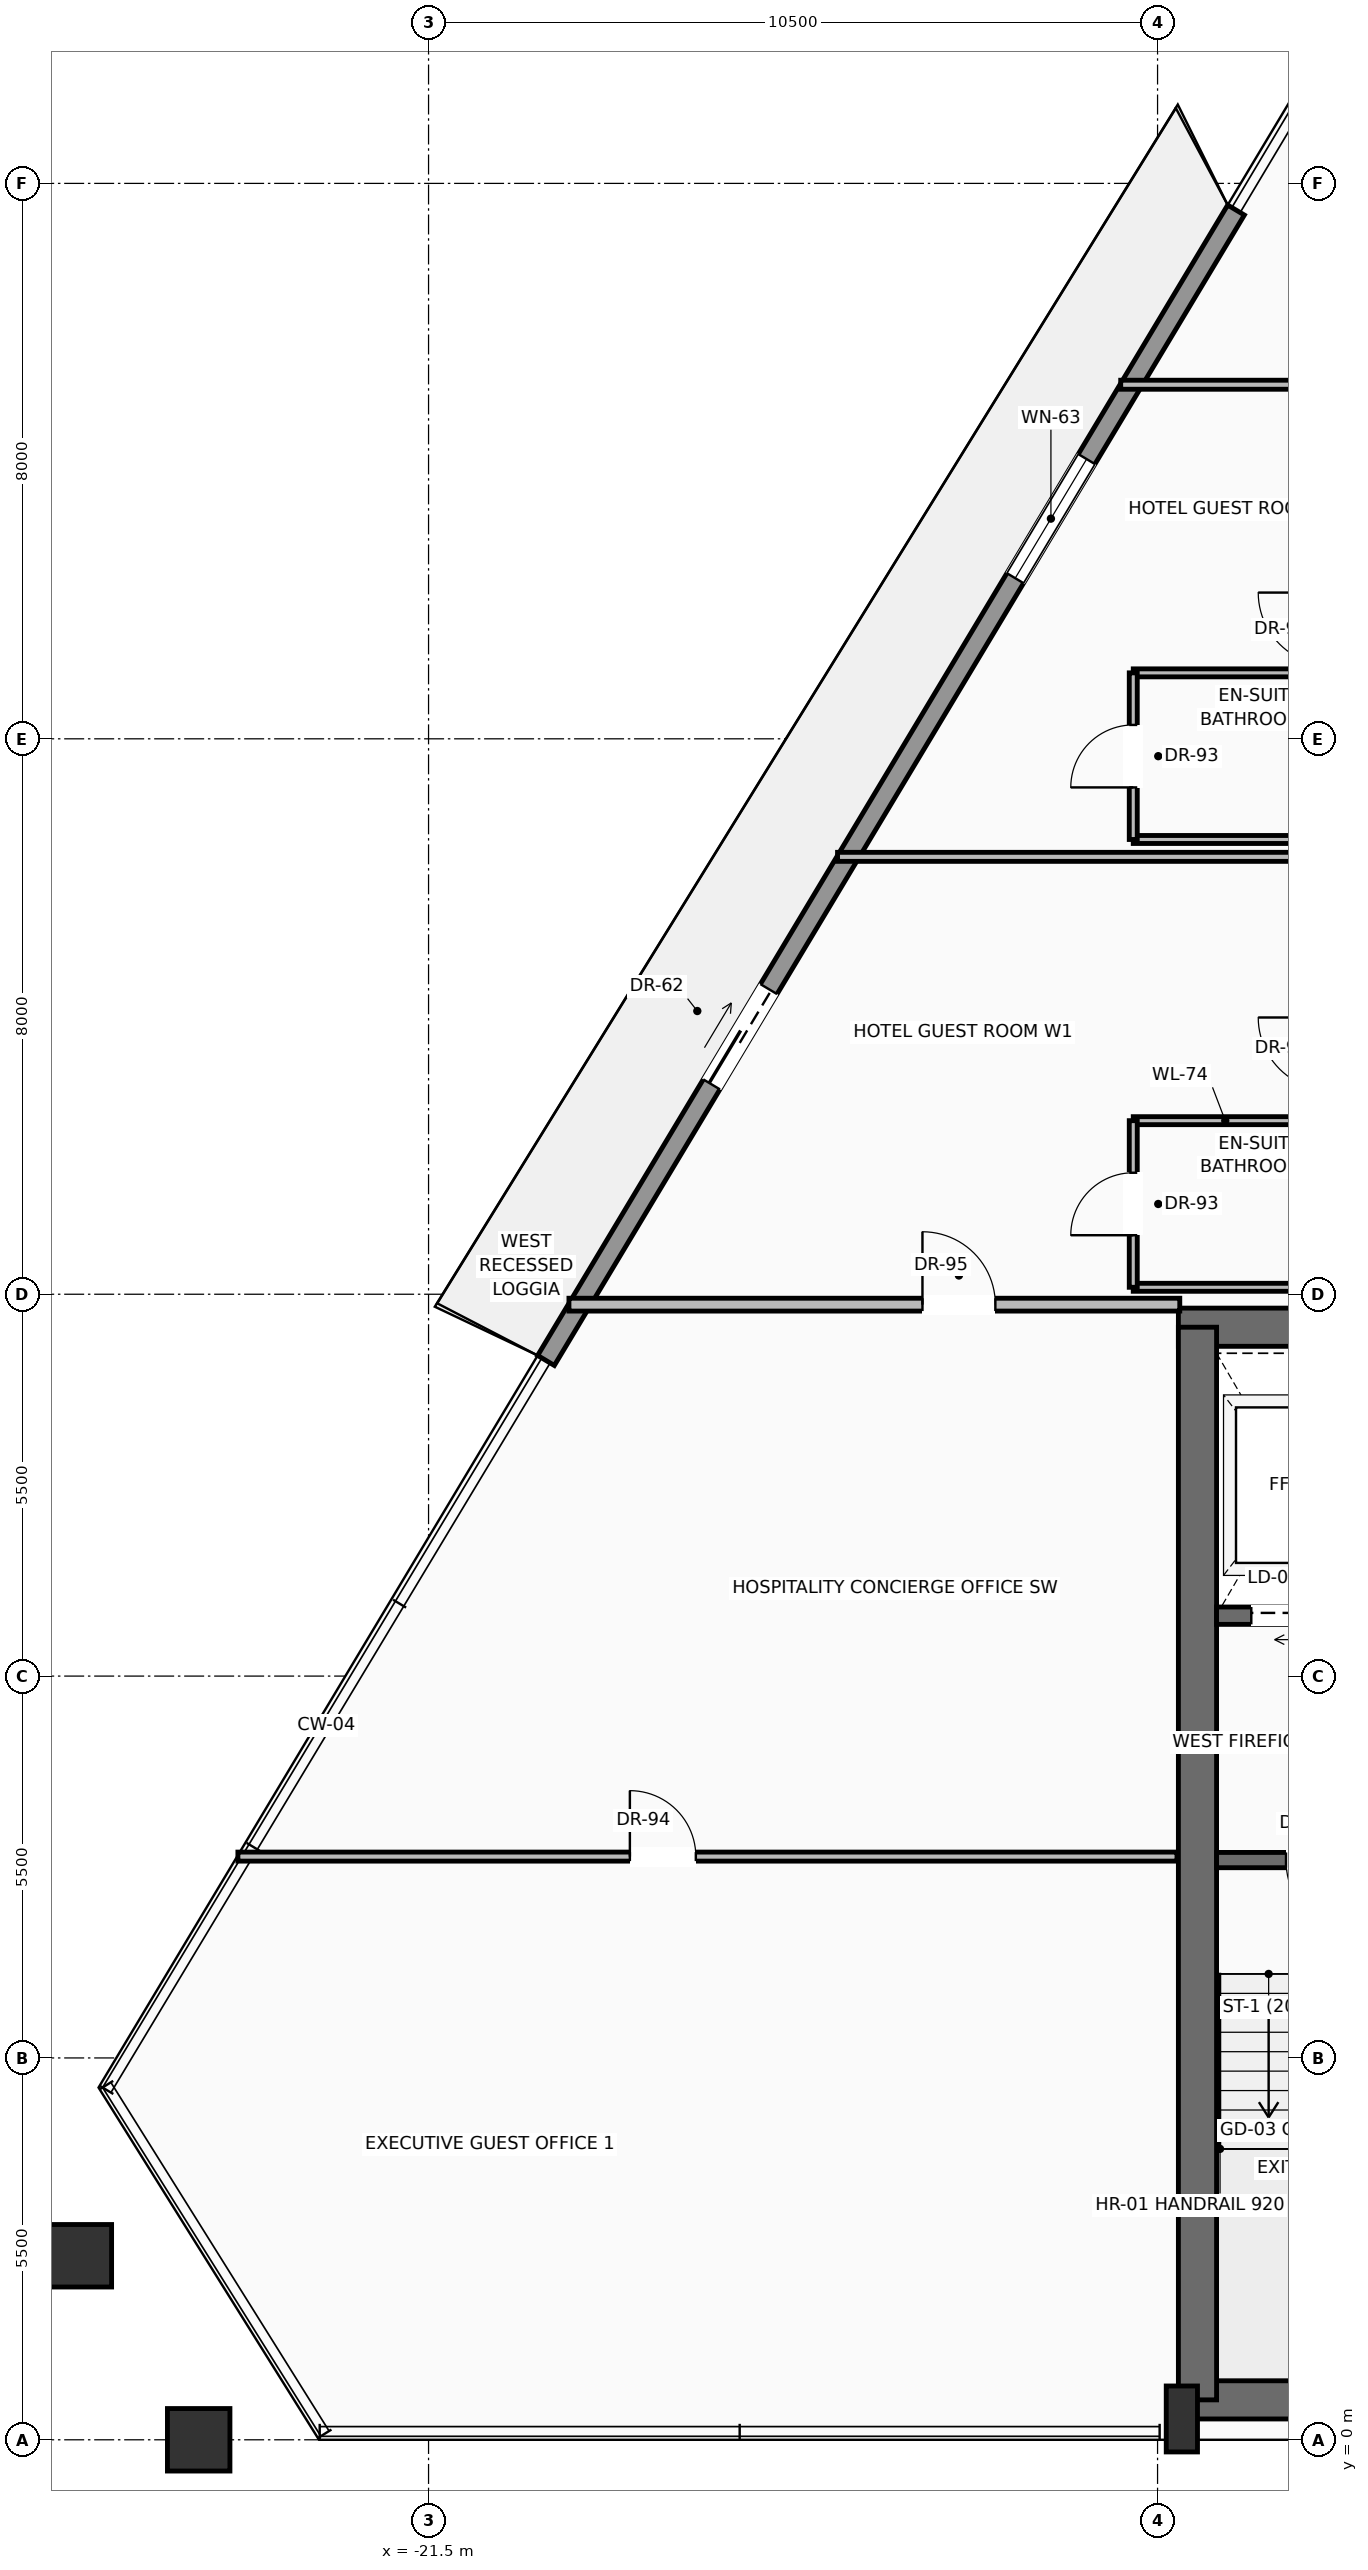
"""IFC4 building model, lengths in metres.
Left out: names, types, materials, properties, quantities, classifications, styles, units other than length and angle.
Written with IfcOpenShell. Run it as: python <this file> out.ifc"""

import sys

from ifc_helpers import new_model, si_unit, direction, frame, frame_2d, origin, origin_2d, place, context, subcontext, project, spatial, rectangle, hollow_rectangle, extrude, source, transform, mapped, element, fill, save


model = new_model("IFC4")
c1 = context("Model", 3, precision=1e-05, world=origin(), true_north=direction((0.0, 1.0)))
c2 = subcontext(c1, "Body", "Model", "MODEL_VIEW")
j1 = project(units=[si_unit("LENGTHUNIT", "METRE"), si_unit("PLANEANGLEUNIT", "RADIAN")], contexts=[c1])
p1 = place(None, origin())
s1 = spatial("IfcSite", under=j1, at=p1, CompositionType="ELEMENT")
p2 = place(p1, origin())
s2 = spatial("IfcBuilding", under=s1, at=p2, CompositionType="ELEMENT")
p3 = place(p2, frame((0.0, 0.0, 220.0)))
s3 = spatial("IfcBuildingStorey", under=s2, at=p3, CompositionType="ELEMENT", Elevation=220.0)
p4 = place(p3, frame((-10.65, 0.575, 0.0), z_axis=(0.0, 0.0, 1.0), x_axis=(1.0, 0.0, 0.0)))
e1 = element("IfcWall", 1, at=p4, inside=s3, PredefinedType="SHEAR", context=c2, shape_type="SweptSolid", body=[
    extrude(rectangle(XDim=21.3, YDim=0.55, at=frame_2d((10.65, 0.0))), origin(), (0.0, 0.0, 1.0), 3.24),
])
p5 = place(p3, frame((-10.7, 16.025, 0.0), z_axis=(0.0, 0.0, 1.0), x_axis=(1.0, 0.0, 0.0)))
e2 = element("IfcWall", 2, at=p5, inside=s3, PredefinedType="SHEAR", context=c2, shape_type="SweptSolid", body=[
    extrude(rectangle(XDim=21.4, YDim=0.55, at=frame_2d((10.7, 0.0))), origin(), (0.0, 0.0, 1.0), 3.24),
])
p6 = place(p5, frame((3.27, 0.0, 0.0)))
e3 = element("IfcOpeningElement", 3, at=p6, cuts=e2, PredefinedType="OPENING", context=c2, shape_type="SweptSolid", body=[
    extrude(rectangle(XDim=1.3, YDim=2.3, at=frame_2d((0.65, 1.15))), frame((0.0, 0.285, 0.0), z_axis=(0.0, -1.0, 0.0), x_axis=(1.0, 0.0, 0.0)), (0.0, 0.0, 1.0), 0.57),
])
p7 = place(p5, frame((9.7, 0.0, 0.0)))
e4 = element("IfcOpeningElement", 4, at=p7, cuts=e2, PredefinedType="OPENING", context=c2, shape_type="SweptSolid", body=[
    extrude(rectangle(XDim=2.0, YDim=2.4, at=frame_2d((1.0, 1.2))), frame((0.0, 0.285, 0.0), z_axis=(0.0, -1.0, 0.0), x_axis=(1.0, 0.0, 0.0)), (0.0, 0.0, 1.0), 0.57),
])
p8 = place(p3, frame((-10.425, 0.575, 0.0), z_axis=(0.0, 0.0, 1.0), x_axis=(0.0, 1.0, 0.0)))
e5 = element("IfcWall", 5, at=p8, inside=s3, PredefinedType="SHEAR", context=c2, shape_type="SweptSolid", body=[
    extrude(rectangle(XDim=15.45, YDim=0.55, at=frame_2d((7.725, 0.0))), origin(), (0.0, 0.0, 1.0), 3.24),
])
m1 = source(origin(), c2, "Body", "SweptSolid", [
    extrude(rectangle(XDim=0.45, YDim=0.95, at=origin_2d()), origin(), (0.0, 0.0, 1.0), 3.45),
])
p9 = place(p3, frame((-10.65, 0.3, 0.0), z_axis=(0.0, 0.0, 1.0), x_axis=(1.0, 0.0, 0.0)))
e6 = element("IfcColumn", 6, at=p9, inside=s3, PredefinedType="PILASTER", context=c2, shape_type="MappedRepresentation", body=[
    mapped(m1, transform((0.0, 0.0, 0.0), scale=1.0)),
])
m2 = source(origin(), c2, "Body", "SweptSolid", [
    extrude(hollow_rectangle(XDim=0.9, YDim=0.9, WallThickness=0.045, at=origin_2d()), origin(), (0.0, 0.0, 1.0), 3.441),
])
p10 = place(p3, frame((-24.811, 0.0, 0.004), z_axis=(-0.005108127751, 0.0, 0.99998695343), x_axis=(0.0, -1.0, 0.0)))
e7 = element("IfcColumn", 7, at=p10, inside=s3, PredefinedType="COLUMN", context=c2, shape_type="MappedRepresentation", body=[
    mapped(m2, transform((0.0, 0.0, 0.0), scale=1.0)),
])
m3 = source(origin(), c2, "Body", "SweptSolid", [
    extrude(hollow_rectangle(XDim=0.9, YDim=0.9, WallThickness=0.045, at=origin_2d()), origin(), (0.0, 0.0, 1.0), 3.442),
])
p11 = place(p3, frame((-26.515, 2.651, 0.004), z_axis=(0.007164359834, -0.017662629689, 0.999818335229), x_axis=(0.926669210153, 0.375877872392, 0.0)))
e8 = element("IfcColumn", 8, at=p11, inside=s3, PredefinedType="COLUMN", context=c2, shape_type="MappedRepresentation", body=[
    mapped(m3, transform((0.0, 0.0, 0.0), scale=1.0)),
])
p12 = place(p3, frame((-19.808, 15.546, 0.0), z_axis=(0.0, 0.0, 1.0), x_axis=(0.514354531287, 0.857577644382, 0.0)))
e9 = element("IfcWall", 9, at=p12, inside=s3, PredefinedType="SOLIDWALL", context=c2, shape_type="SweptSolid", body=[
    extrude(rectangle(XDim=19.322, YDim=0.28, at=frame_2d((9.661, 0.0))), origin(), (0.0, 0.0, 1.0), 2.82),
])
p13 = place(p12, frame((4.637, 0.0, 0.0)))
e10 = element("IfcOpeningElement", 10, at=p13, cuts=e9, PredefinedType="OPENING", context=c2, shape_type="SweptSolid", body=[
    extrude(rectangle(XDim=1.6, YDim=2.35, at=frame_2d((0.8, 1.175))), frame((0.0, 0.15, 0.0), z_axis=(0.0, -1.0, 0.0), x_axis=(1.0, 0.0, 0.0)), (0.0, 0.0, 1.0), 0.3),
])
p14 = place(p12, frame((13.139, 0.0, 0.9)))
e11 = element("IfcOpeningElement", 11, at=p14, cuts=e9, PredefinedType="OPENING", context=c2, shape_type="SweptSolid", body=[
    extrude(rectangle(XDim=2.0, YDim=1.75, at=frame_2d((1.0, 0.875))), frame((0.0, 0.15, 0.0), z_axis=(0.0, -1.0, 0.0), x_axis=(1.0, 0.0, 0.0)), (0.0, 0.0, 1.0), 0.3),
])
p15 = place(p3, frame((-5.5, 8.35, 0.0), z_axis=(0.0, 0.0, 1.0), x_axis=(-1.0, 0.0, 0.0)))
e12 = element("IfcWall", 12, at=p15, inside=s3, PredefinedType="SOLIDWALL", context=c2, shape_type="SweptSolid", body=[
    extrude(rectangle(XDim=4.65, YDim=0.22, at=frame_2d((2.325, 0.0))), origin(), (0.0, 0.0, 1.0), 3.24),
])
p16 = place(p15, frame((2.5, 0.0, 0.0)))
e13 = element("IfcOpeningElement", 13, at=p16, cuts=e12, PredefinedType="OPENING", context=c2, shape_type="SweptSolid", body=[
    extrude(rectangle(XDim=1.15, YDim=2.2, at=frame_2d((0.575, 1.1))), frame((0.0, 0.12, 0.0), z_axis=(0.0, -1.0, 0.0), x_axis=(1.0, 0.0, 0.0)), (0.0, 0.0, 1.0), 0.24),
])
p17 = place(p3, frame((-5.5, 11.87, 0.0), z_axis=(0.0, 0.0, 1.0), x_axis=(-1.0, 0.0, 0.0)))
e14 = element("IfcWall", 14, at=p17, inside=s3, PredefinedType="SOLIDWALL", context=c2, shape_type="SweptSolid", body=[
    extrude(rectangle(XDim=4.65, YDim=0.25, at=frame_2d((2.325, 0.0))), origin(), (0.0, 0.0, 1.0), 3.24),
])
p18 = place(p17, frame((2.95, 0.0, 0.0)))
e15 = element("IfcOpeningElement", 15, at=p18, cuts=e14, PredefinedType="OPENING", context=c2, shape_type="SweptSolid", body=[
    extrude(rectangle(XDim=1.2, YDim=2.25, at=frame_2d((0.6, 1.125))), frame((0.0, 0.135, 0.0), z_axis=(0.0, -1.0, 0.0), x_axis=(1.0, 0.0, 0.0)), (0.0, 0.0, 1.0), 0.27),
])
p19 = place(p3, frame((-19.478, 16.35, 0.0), z_axis=(0.0, 0.0, 1.0), x_axis=(1.0, 0.0, 0.0)))
e16 = element("IfcWall", 16, at=p19, inside=s3, PredefinedType="PARTITIONING", context=c2, shape_type="SweptSolid", body=[
    extrude(rectangle(XDim=8.798, YDim=0.185, at=frame_2d((4.399, 0.0))), origin(), (0.0, 0.0, 1.0), 3.232),
])
p20 = place(p19, frame((5.092, 0.0, 0.0)))
e17 = element("IfcOpeningElement", 17, at=p20, cuts=e16, PredefinedType="OPENING", context=c2, shape_type="SweptSolid", body=[
    extrude(rectangle(XDim=1.05, YDim=2.25, at=frame_2d((0.525, 1.125))), frame((0.0, 0.103, 0.0), z_axis=(0.0, -1.0, 0.0), x_axis=(1.0, 0.0, 0.0)), (0.0, 0.0, 1.0), 0.205),
])
p21 = place(p3, frame((-11.531, 29.6, 0.0), z_axis=(0.0, 0.0, 1.0), x_axis=(1.0, 0.0, 0.0)))
e18 = element("IfcWall", 18, at=p21, inside=s3, PredefinedType="PARTITIONING", context=c2, shape_type="SweptSolid", body=[
    extrude(rectangle(XDim=3.031, YDim=0.13, at=frame_2d((1.515, 0.0))), origin(), (0.0, 0.0, 1.0), 3.232),
])
p22 = place(p3, frame((-24.246, 8.4, 0.0), z_axis=(0.0, 0.0, 1.0), x_axis=(1.0, 0.0, 0.0)))
e19 = element("IfcWall", 19, at=p22, inside=s3, PredefinedType="PARTITIONING", context=c2, shape_type="SweptSolid", body=[
    extrude(rectangle(XDim=13.526, YDim=0.13, at=frame_2d((6.763, 0.0))), origin(), (0.0, 0.0, 1.0), 3.232),
])
p23 = place(p22, frame((5.646, 0.0, 0.0)))
e20 = element("IfcOpeningElement", 20, at=p23, cuts=e19, PredefinedType="OPENING", context=c2, shape_type="SweptSolid", body=[
    extrude(rectangle(XDim=0.95, YDim=2.2, at=frame_2d((0.475, 1.1))), frame((0.0, 0.075, 0.0), z_axis=(0.0, -1.0, 0.0), x_axis=(1.0, 0.0, 0.0)), (0.0, 0.0, 1.0), 0.15),
])
for number, where, z_axis, x_axis in (
    (21, (-11.35, 16.6, 0.0), (0.0, 0.0, 1.0), (1.0, 0.0, 0.0)),
    (22, (-11.35, 19.0, 0.0), (0.0, 0.0, 1.0), (1.0, 0.0, 0.0)),
):
    element("IfcWall", number, at=place(p3, frame(where, z_axis=z_axis, x_axis=x_axis)), inside=s3, PredefinedType="PARTITIONING", context=c2, shape_type="SweptSolid", body=[
        extrude(rectangle(XDim=2.65, YDim=0.115, at=frame_2d((1.325, 0.0))), origin(), (0.0, 0.0, 1.0), 3.232),
    ])
p24 = place(p3, frame((-11.35, 16.6, 0.0), z_axis=(0.0, 0.0, 1.0), x_axis=(0.0, 1.0, 0.0)))
e23 = element("IfcWall", 23, at=p24, inside=s3, PredefinedType="PARTITIONING", context=c2, shape_type="SweptSolid", body=[
    extrude(rectangle(XDim=2.4, YDim=0.115, at=frame_2d((1.2, 0.0))), origin(), (0.0, 0.0, 1.0), 3.232),
])
p25 = place(p24, frame((0.75, 0.0, 0.0)))
e24 = element("IfcOpeningElement", 24, at=p25, cuts=e23, PredefinedType="OPENING", context=c2, shape_type="SweptSolid", body=[
    extrude(rectangle(XDim=0.9, YDim=2.15, at=frame_2d((0.45, 1.075))), frame((0.0, 0.067, 0.0), z_axis=(0.0, -1.0, 0.0), x_axis=(1.0, 0.0, 0.0)), (0.0, 0.0, 1.0), 0.135),
])
p26 = place(p3, frame((-15.609, 22.8, 0.0), z_axis=(0.0, 0.0, 1.0), x_axis=(1.0, 0.0, 0.0)))
e25 = element("IfcWall", 25, at=p26, inside=s3, PredefinedType="PARTITIONING", context=c2, shape_type="SweptSolid", body=[
    extrude(rectangle(XDim=7.109, YDim=0.13, at=frame_2d((3.555, 0.0))), origin(), (0.0, 0.0, 1.0), 3.232),
])
for number, where, z_axis, x_axis in (
    (26, (-11.35, 23.05, 0.0), (0.0, 0.0, 1.0), (1.0, 0.0, 0.0)),
    (27, (-11.35, 25.45, 0.0), (0.0, 0.0, 1.0), (1.0, 0.0, 0.0)),
):
    element("IfcWall", number, at=place(p3, frame(where, z_axis=z_axis, x_axis=x_axis)), inside=s3, PredefinedType="PARTITIONING", context=c2, shape_type="SweptSolid", body=[
        extrude(rectangle(XDim=2.65, YDim=0.115, at=frame_2d((1.325, 0.0))), origin(), (0.0, 0.0, 1.0), 3.232),
    ])
p27 = place(p3, frame((-11.35, 23.05, 0.0), z_axis=(0.0, 0.0, 1.0), x_axis=(0.0, 1.0, 0.0)))
e28 = element("IfcWall", 28, at=p27, inside=s3, PredefinedType="PARTITIONING", context=c2, shape_type="SweptSolid", body=[
    extrude(rectangle(XDim=2.4, YDim=0.115, at=frame_2d((1.2, 0.0))), origin(), (0.0, 0.0, 1.0), 3.232),
])
p28 = place(p27, frame((0.75, 0.0, 0.0)))
e29 = element("IfcOpeningElement", 29, at=p28, cuts=e28, PredefinedType="OPENING", context=c2, shape_type="SweptSolid", body=[
    extrude(rectangle(XDim=0.9, YDim=2.15, at=frame_2d((0.45, 1.075))), frame((0.0, 0.067, 0.0), z_axis=(0.0, -1.0, 0.0), x_axis=(1.0, 0.0, 0.0)), (0.0, 0.0, 1.0), 0.135),
])
m4 = source(origin(), c2, "Body", "SweptSolid", [
    extrude(rectangle(XDim=1.6, YDim=2.35, at=frame_2d((0.8, 1.175))), frame((0.0, 0.025, 0.0), z_axis=(0.0, -1.0, 0.0), x_axis=(1.0, 0.0, 0.0)), (0.0, 0.0, 1.0), 0.05),
])
p29 = place(p13, origin())
e30 = element("IfcDoor", 30, at=p29, inside=s3, OperationType="SLIDING_TO_LEFT", PredefinedType="DOOR", context=c2, shape_type="MappedRepresentation", body=[
    mapped(m4, transform((0.0, 0.0, 0.0), scale=1.0)),
])
fill(e10, e30)
m5 = source(origin(), c2, "Body", "SweptSolid", [
    extrude(rectangle(XDim=2.0, YDim=1.75, at=frame_2d((1.0, 0.875))), frame((0.0, 0.03, 0.0), z_axis=(0.0, -1.0, 0.0), x_axis=(1.0, 0.0, 0.0)), (0.0, 0.0, 1.0), 0.06),
])
p30 = place(p14, origin())
e31 = element("IfcWindow", 31, at=p30, inside=s3, PartitioningType="SINGLE_PANEL", PredefinedType="WINDOW", context=c2, shape_type="MappedRepresentation", body=[
    mapped(m5, transform((0.0, 0.0, 0.0), scale=1.0)),
])
fill(e11, e31)
m6 = source(origin(), c2, "Body", "SweptSolid", [
    extrude(rectangle(XDim=1.15, YDim=2.2, at=frame_2d((0.575, 1.1))), frame((0.0, 0.025, 0.0), z_axis=(0.0, -1.0, 0.0), x_axis=(1.0, 0.0, 0.0)), (0.0, 0.0, 1.0), 0.05),
])
p31 = place(p16, origin())
e32 = element("IfcDoor", 32, at=p31, inside=s3, OperationType="SINGLE_SWING_LEFT", PredefinedType="DOOR", context=c2, shape_type="MappedRepresentation", body=[
    mapped(m6, transform((0.0, 0.0, 0.0), scale=1.0)),
])
fill(e13, e32)
m7 = source(origin(), c2, "Body", "SweptSolid", [
    extrude(rectangle(XDim=1.2, YDim=2.25, at=frame_2d((0.6, 1.125))), frame((0.0, 0.025, 0.0), z_axis=(0.0, -1.0, 0.0), x_axis=(1.0, 0.0, 0.0)), (0.0, 0.0, 1.0), 0.05),
])
p32 = place(p18, origin())
e33 = element("IfcDoor", 33, at=p32, inside=s3, OperationType="SLIDING_TO_LEFT", PredefinedType="DOOR", context=c2, shape_type="MappedRepresentation", body=[
    mapped(m7, transform((0.0, 0.0, 0.0), scale=1.0)),
])
fill(e15, e33)
m8 = source(origin(), c2, "Body", "SweptSolid", [
    extrude(rectangle(XDim=1.05, YDim=2.25, at=frame_2d((0.525, 1.125))), frame((0.0, 0.025, 0.0), z_axis=(0.0, -1.0, 0.0), x_axis=(1.0, 0.0, 0.0)), (0.0, 0.0, 1.0), 0.05),
])
p33 = place(p20, origin())
e34 = element("IfcDoor", 34, at=p33, inside=s3, OperationType="SINGLE_SWING_LEFT", PredefinedType="DOOR", context=c2, shape_type="MappedRepresentation", body=[
    mapped(m8, transform((0.0, 0.0, 0.0), scale=1.0)),
])
fill(e17, e34)
m9 = source(origin(), c2, "Body", "SweptSolid", [
    extrude(rectangle(XDim=0.95, YDim=2.2, at=frame_2d((0.475, 1.1))), frame((0.0, 0.025, 0.0), z_axis=(0.0, -1.0, 0.0), x_axis=(1.0, 0.0, 0.0)), (0.0, 0.0, 1.0), 0.05),
])
p34 = place(p23, origin())
e35 = element("IfcDoor", 35, at=p34, inside=s3, OperationType="SINGLE_SWING_LEFT", PredefinedType="DOOR", context=c2, shape_type="MappedRepresentation", body=[
    mapped(m9, transform((0.0, 0.0, 0.0), scale=1.0)),
])
fill(e20, e35)
m10 = source(origin(), c2, "Body", "SweptSolid", [
    extrude(rectangle(XDim=0.9, YDim=2.15, at=frame_2d((0.45, 1.075))), frame((0.0, 0.025, 0.0), z_axis=(0.0, -1.0, 0.0), x_axis=(1.0, 0.0, 0.0)), (0.0, 0.0, 1.0), 0.05),
])
p35 = place(p25, origin())
e36 = element("IfcDoor", 36, at=p35, inside=s3, OperationType="SINGLE_SWING_LEFT", PredefinedType="DOOR", context=c2, shape_type="MappedRepresentation", body=[
    mapped(m10, transform((0.0, 0.0, 0.0), scale=1.0)),
])
fill(e24, e36)
p36 = place(p28, origin())
e37 = element("IfcDoor", 37, at=p36, inside=s3, OperationType="SINGLE_SWING_LEFT", PredefinedType="DOOR", context=c2, shape_type="MappedRepresentation", body=[
    mapped(m10, transform((0.0, 0.0, 0.0), scale=1.0)),
])
fill(e29, e37)
save(model, sys.argv[1])
